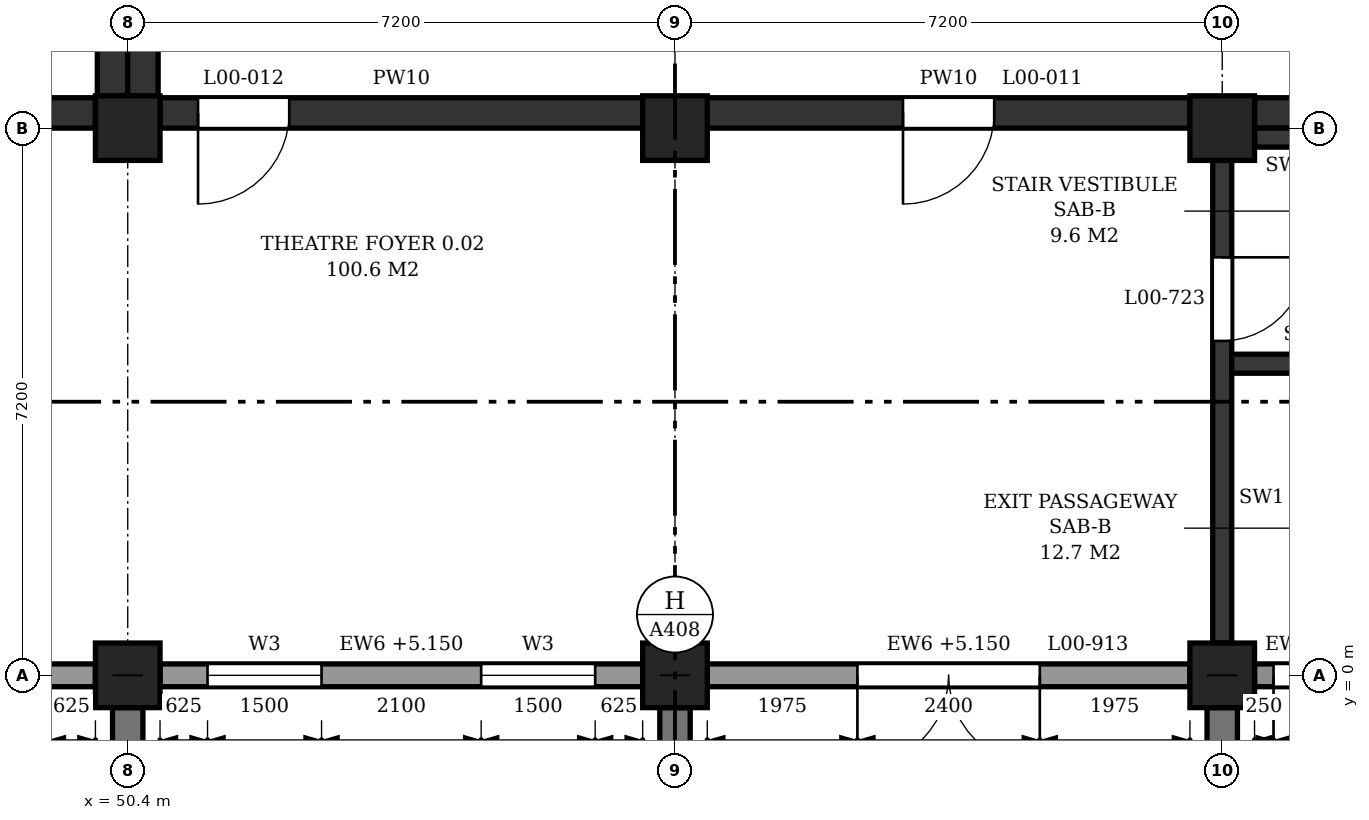
"""IFC4 building model, lengths in metres.
Left out: names, types, materials, properties, quantities, classifications, styles, units other than length and angle.
Written with IfcOpenShell. Run it as: python <this file> out.ifc"""

import sys

from ifc_helpers import new_model, si_unit, direction, frame, frame_2d, origin, origin_2d, place, context, subcontext, project, spatial, polyline, rectangle, outline, extrude, element, fill, save


model = new_model("IFC4")
c1 = context("Model", 3, precision=1e-05, world=origin(), true_north=direction((0.0, 1.0)))
c2 = subcontext(c1, "Body", "Model", "MODEL_VIEW")
j1 = project(units=[si_unit("LENGTHUNIT", "METRE"), si_unit("PLANEANGLEUNIT", "RADIAN")], contexts=[c1])
p1 = place(None, origin())
s1 = spatial("IfcSite", under=j1, at=p1, CompositionType="ELEMENT")
p2 = place(p1, origin())
s2 = spatial("IfcBuilding", under=s1, at=p2, CompositionType="ELEMENT")
p3 = place(p2, origin())
s3 = spatial("IfcBuildingStorey", under=s2, at=p3, CompositionType="ELEMENT", Elevation=0.0)
for number, where, z_axis, x_axis in (
    (1, (50.4, 0.0, 0.0), (0.0, 0.0, 1.0), (1.0, 0.0, 0.0)),
    (2, (50.4, 7.2, 0.0), (0.0, 0.0, 1.0), (1.0, 0.0, 0.0)),
    (3, (57.6, 0.0, 0.0), (0.0, 0.0, 1.0), (1.0, 0.0, 0.0)),
    (4, (57.6, 7.2, 0.0), (0.0, 0.0, 1.0), (1.0, 0.0, 0.0)),
    (5, (64.8, 0.0, 0.0), (0.0, 0.0, 1.0), (1.0, 0.0, 0.0)),
    (6, (64.8, 7.2, 0.0), (0.0, 0.0, 1.0), (1.0, 0.0, 0.0)),
):
    element("IfcColumn", number, at=place(p3, frame(where, z_axis=z_axis, x_axis=x_axis)), inside=s3, PredefinedType="COLUMN", context=c2, shape_type="SweptSolid", body=[
        extrude(rectangle(XDim=0.85, YDim=0.85, at=origin_2d()), origin(), (0.0, 0.0, 1.0), 6.0),
    ])
p4 = place(p3, frame((43.625, 0.0, 0.0), z_axis=(0.0, 0.0, 1.0), x_axis=(1.0, 0.0, 0.0)))
e7 = element("IfcWall", 7, at=p4, inside=s3, PredefinedType="STANDARD", context=c2, shape_type="SweptSolid", body=[
    extrude(rectangle(XDim=6.35, YDim=0.3, at=frame_2d((3.175, 0.0))), origin(), (0.0, 0.0, 1.0), 5.15),
])
p5 = place(p4, frame((0.625, 0.0, 0.9)))
e8 = element("IfcOpeningElement", 8, at=p5, cuts=e7, PredefinedType="OPENING", context=c2, shape_type="SweptSolid", body=[
    extrude(outline(polyline([(0.0, 0.0), (1.5, 0.0), (1.5, 3.25), (0.75, 4.0), (0.0, 3.25), (0.0, 0.0)])), frame((0.0, 0.16, 0.0), z_axis=(0.0, -1.0, 0.0), x_axis=(1.0, 0.0, 0.0)), (0.0, 0.0, 1.0), 0.32),
])
p6 = place(p4, frame((4.225, 0.0, 0.9)))
e9 = element("IfcOpeningElement", 9, at=p6, cuts=e7, PredefinedType="OPENING", context=c2, shape_type="SweptSolid", body=[
    extrude(outline(polyline([(0.0, 0.0), (1.5, 0.0), (1.5, 3.25), (0.75, 4.0), (0.0, 3.25), (0.0, 0.0)])), frame((0.0, 0.16, 0.0), z_axis=(0.0, -1.0, 0.0), x_axis=(1.0, 0.0, 0.0)), (0.0, 0.0, 1.0), 0.32),
])
p7 = place(p3, frame((50.825, 0.0, 0.0), z_axis=(0.0, 0.0, 1.0), x_axis=(1.0, 0.0, 0.0)))
e10 = element("IfcWall", 10, at=p7, inside=s3, PredefinedType="STANDARD", context=c2, shape_type="SweptSolid", body=[
    extrude(rectangle(XDim=6.35, YDim=0.3, at=frame_2d((3.175, 0.0))), origin(), (0.0, 0.0, 1.0), 5.15),
])
p8 = place(p7, frame((0.625, 0.0, 0.9)))
e11 = element("IfcOpeningElement", 11, at=p8, cuts=e10, PredefinedType="OPENING", context=c2, shape_type="SweptSolid", body=[
    extrude(outline(polyline([(0.0, 0.0), (1.5, 0.0), (1.5, 3.25), (0.75, 4.0), (0.0, 3.25), (0.0, 0.0)])), frame((0.0, 0.16, 0.0), z_axis=(0.0, -1.0, 0.0), x_axis=(1.0, 0.0, 0.0)), (0.0, 0.0, 1.0), 0.32),
])
p9 = place(p7, frame((4.225, 0.0, 0.9)))
e12 = element("IfcOpeningElement", 12, at=p9, cuts=e10, PredefinedType="OPENING", context=c2, shape_type="SweptSolid", body=[
    extrude(outline(polyline([(0.0, 0.0), (1.5, 0.0), (1.5, 3.25), (0.75, 4.0), (0.0, 3.25), (0.0, 0.0)])), frame((0.0, 0.16, 0.0), z_axis=(0.0, -1.0, 0.0), x_axis=(1.0, 0.0, 0.0)), (0.0, 0.0, 1.0), 0.32),
])
p10 = place(p3, frame((58.025, 0.0, 0.0), z_axis=(0.0, 0.0, 1.0), x_axis=(1.0, 0.0, 0.0)))
e13 = element("IfcWall", 13, at=p10, inside=s3, PredefinedType="STANDARD", context=c2, shape_type="SweptSolid", body=[
    extrude(rectangle(XDim=6.35, YDim=0.3, at=frame_2d((3.175, 0.0))), origin(), (0.0, 0.0, 1.0), 5.15),
])
p11 = place(p10, frame((1.975, 0.0, 0.0)))
e14 = element("IfcOpeningElement", 14, at=p11, cuts=e13, PredefinedType="OPENING", context=c2, shape_type="SweptSolid", body=[
    extrude(outline(polyline([(0.0, 0.0), (2.4, 0.0), (2.4, 2.0), (1.2, 3.2), (0.0, 2.0), (0.0, 0.0)])), frame((0.0, 0.16, 0.0), z_axis=(0.0, -1.0, 0.0), x_axis=(1.0, 0.0, 0.0)), (0.0, 0.0, 1.0), 0.32),
])
p12 = place(p3, frame((65.225, 0.0, 0.0), z_axis=(0.0, 0.0, 1.0), x_axis=(1.0, 0.0, 0.0)))
e15 = element("IfcWall", 15, at=p12, inside=s3, PredefinedType="STANDARD", context=c2, shape_type="SweptSolid", body=[
    extrude(rectangle(XDim=6.35, YDim=0.3, at=frame_2d((3.175, 0.0))), origin(), (0.0, 0.0, 1.0), 5.15),
])
p13 = place(p12, frame((0.25, 0.0, 0.0)))
e16 = element("IfcOpeningElement", 16, at=p13, cuts=e15, PredefinedType="OPENING", context=c2, shape_type="SweptSolid", body=[
    extrude(rectangle(XDim=2.0, YDim=2.1, at=frame_2d((1.0, 1.05))), frame((0.0, 0.16, 0.0), z_axis=(0.0, -1.0, 0.0), x_axis=(1.0, 0.0, 0.0)), (0.0, 0.0, 1.0), 0.32),
])
p14 = place(p12, frame((4.525, 0.0, 0.9)))
e17 = element("IfcOpeningElement", 17, at=p14, cuts=e15, PredefinedType="OPENING", context=c2, shape_type="SweptSolid", body=[
    extrude(outline(polyline([(0.0, 0.0), (0.9, 0.0), (0.9, 3.55), (0.45, 4.0), (0.0, 3.55), (0.0, 0.0)])), frame((0.0, 0.16, 0.0), z_axis=(0.0, -1.0, 0.0), x_axis=(1.0, 0.0, 0.0)), (0.0, 0.0, 1.0), 0.32),
])
for number, where, z_axis, x_axis in (
    (18, (50.4, -0.425, 0.0), (0.0, 0.0, 1.0), (0.0, -1.0, 0.0)),
    (19, (57.6, -0.425, 0.0), (0.0, 0.0, 1.0), (0.0, -1.0, 0.0)),
    (20, (64.8, -0.425, 0.0), (0.0, 0.0, 1.0), (0.0, -1.0, 0.0)),
):
    element("IfcWall", number, at=place(p3, frame(where, z_axis=z_axis, x_axis=x_axis)), inside=s3, PredefinedType="POLYGONAL", context=c2, shape_type="SweptSolid", body=[
        extrude(outline(polyline([(1.2, 0.0), (1.2, 9.825), (0.15, 11.4), (0.0, 11.4), (0.0, 0.0), (1.2, 0.0)])), frame((0.0, 0.2, 0.0), z_axis=(0.0, -1.0, 0.0), x_axis=(1.0, 0.0, 0.0)), (0.0, 0.0, 1.0), 0.4),
    ])
p15 = place(p3, frame((65.225, 7.075, 0.0), z_axis=(0.0, 0.0, 1.0), x_axis=(1.0, 0.0, 0.0)))
e21 = element("IfcWall", 21, at=p15, inside=s3, PredefinedType="SHEAR", context=c2, shape_type="SweptSolid", body=[
    extrude(rectangle(XDim=6.35, YDim=0.25, at=frame_2d((3.175, 0.0))), origin(), (0.0, 0.0, 1.0), 5.05),
])
p16 = place(p3, frame((64.8, 0.425, 0.0), z_axis=(0.0, 0.0, 1.0), x_axis=(0.0, 1.0, 0.0)))
e22 = element("IfcWall", 22, at=p16, inside=s3, PredefinedType="SHEAR", context=c2, shape_type="SweptSolid", body=[
    extrude(rectangle(XDim=6.35, YDim=0.25, at=frame_2d((3.175, 0.0))), origin(), (0.0, 0.0, 1.0), 5.0),
])
p17 = place(p16, frame((3.975, 0.0, 0.0)))
e23 = element("IfcOpeningElement", 23, at=p17, cuts=e22, PredefinedType="OPENING", context=c2, shape_type="SweptSolid", body=[
    extrude(rectangle(XDim=1.1, YDim=2.1, at=frame_2d((0.55, 1.05))), frame((0.0, 0.135, 0.0), z_axis=(0.0, -1.0, 0.0), x_axis=(1.0, 0.0, 0.0)), (0.0, 0.0, 1.0), 0.27),
])
p18 = place(p3, frame((64.925, 4.1, 0.0), z_axis=(0.0, 0.0, 1.0), x_axis=(1.0, 0.0, 0.0)))
e24 = element("IfcWall", 24, at=p18, inside=s3, PredefinedType="SHEAR", context=c2, shape_type="SweptSolid", body=[
    extrude(rectangle(XDim=2.975, YDim=0.25, at=frame_2d((1.487, 0.0))), origin(), (0.0, 0.0, 1.0), 5.75),
])
p19 = place(p18, frame((1.425, 0.0, 0.0)))
e25 = element("IfcOpeningElement", 25, at=p19, cuts=e24, PredefinedType="OPENING", context=c2, shape_type="SweptSolid", body=[
    extrude(rectangle(XDim=1.1, YDim=2.1, at=frame_2d((0.55, 1.05))), frame((0.0, 0.135, 0.0), z_axis=(0.0, -1.0, 0.0), x_axis=(1.0, 0.0, 0.0)), (0.0, 0.0, 1.0), 0.27),
])
p20 = place(p3, frame((43.625, 7.4, 0.0), z_axis=(0.0, 0.0, 1.0), x_axis=(1.0, 0.0, 0.0)))
e26 = element("IfcWall", 26, at=p20, inside=s3, PredefinedType="SOLIDWALL", context=c2, shape_type="SweptSolid", body=[
    extrude(rectangle(XDim=6.35, YDim=0.4, at=frame_2d((3.175, 0.0))), origin(), (0.0, 0.0, 1.0), 10.7),
])
p21 = place(p20, frame((2.575, 0.0, 0.0)))
e27 = element("IfcOpeningElement", 27, at=p21, cuts=e26, PredefinedType="OPENING", context=c2, shape_type="SweptSolid", body=[
    extrude(rectangle(XDim=1.2, YDim=2.1, at=frame_2d((0.6, 1.05))), frame((0.0, 0.21, 0.0), z_axis=(0.0, -1.0, 0.0), x_axis=(1.0, 0.0, 0.0)), (0.0, 0.0, 1.0), 0.42),
])
p22 = place(p3, frame((50.825, 7.4, 0.0), z_axis=(0.0, 0.0, 1.0), x_axis=(1.0, 0.0, 0.0)))
e28 = element("IfcWall", 28, at=p22, inside=s3, PredefinedType="SOLIDWALL", context=c2, shape_type="SweptSolid", body=[
    extrude(rectangle(XDim=6.35, YDim=0.4, at=frame_2d((3.175, 0.0))), origin(), (0.0, 0.0, 1.0), 10.7),
])
p23 = place(p22, frame((0.5, 0.0, 0.0)))
e29 = element("IfcOpeningElement", 29, at=p23, cuts=e28, PredefinedType="OPENING", context=c2, shape_type="SweptSolid", body=[
    extrude(rectangle(XDim=1.2, YDim=2.1, at=frame_2d((0.6, 1.05))), frame((0.0, 0.21, 0.0), z_axis=(0.0, -1.0, 0.0), x_axis=(1.0, 0.0, 0.0)), (0.0, 0.0, 1.0), 0.42),
])
p24 = place(p3, frame((58.025, 7.4, 0.0), z_axis=(0.0, 0.0, 1.0), x_axis=(1.0, 0.0, 0.0)))
e30 = element("IfcWall", 30, at=p24, inside=s3, PredefinedType="SOLIDWALL", context=c2, shape_type="SweptSolid", body=[
    extrude(rectangle(XDim=6.35, YDim=0.4, at=frame_2d((3.175, 0.0))), origin(), (0.0, 0.0, 1.0), 10.7),
])
p25 = place(p24, frame((2.575, 0.0, 0.0)))
e31 = element("IfcOpeningElement", 31, at=p25, cuts=e30, PredefinedType="OPENING", context=c2, shape_type="SweptSolid", body=[
    extrude(rectangle(XDim=1.2, YDim=2.1, at=frame_2d((0.6, 1.05))), frame((0.0, 0.21, 0.0), z_axis=(0.0, -1.0, 0.0), x_axis=(1.0, 0.0, 0.0)), (0.0, 0.0, 1.0), 0.42),
])
p26 = place(p3, frame((65.225, 7.4, 0.0), z_axis=(0.0, 0.0, 1.0), x_axis=(1.0, 0.0, 0.0)))
e32 = element("IfcWall", 32, at=p26, inside=s3, PredefinedType="SOLIDWALL", context=c2, shape_type="SweptSolid", body=[
    extrude(rectangle(XDim=6.35, YDim=0.4, at=frame_2d((3.175, 0.0))), origin(), (0.0, 0.0, 1.0), 10.7),
])
for number, where, z_axis, x_axis in (
    (33, (50.2, 7.625, 0.0), (0.0, 0.0, 1.0), (0.0, 1.0, 0.0)),
    (34, (50.6, 7.625, 0.0), (0.0, 0.0, 1.0), (0.0, 1.0, 0.0)),
):
    element("IfcWall", number, at=place(p3, frame(where, z_axis=z_axis, x_axis=x_axis)), inside=s3, PredefinedType="SOLIDWALL", context=c2, shape_type="SweptSolid", body=[
        extrude(rectangle(XDim=6.35, YDim=0.4, at=frame_2d((3.175, 0.0))), origin(), (0.0, 0.0, 1.0), 10.7),
    ])
p27 = place(p13, frame((2.0, 0.0, 0.0), z_axis=(0.0, 0.0, 1.0), x_axis=(-1.0, 0.0, 0.0)))
e35 = element("IfcDoor", 35, at=p27, inside=s3, OperationType="DOUBLE_DOOR_SINGLE_SWING", PredefinedType="DOOR", context=c2, shape_type="SweptSolid", body=[
    extrude(rectangle(XDim=2.0, YDim=2.1, at=frame_2d((1.0, 1.05))), frame((0.0, 0.025, 0.0), z_axis=(0.0, -1.0, 0.0), x_axis=(1.0, 0.0, 0.0)), (0.0, 0.0, 1.0), 0.05),
])
fill(e16, e35)
p28 = place(p11, frame((2.4, 0.0, 0.0), z_axis=(0.0, 0.0, 1.0), x_axis=(-1.0, 0.0, 0.0)))
e36 = element("IfcDoor", 36, at=p28, inside=s3, OperationType="DOUBLE_DOOR_SINGLE_SWING", PredefinedType="DOOR", context=c2, shape_type="SweptSolid", body=[
    extrude(outline(polyline([(2.4, 2.0), (1.2, 3.2), (0.0, 2.0), (0.0, 0.0), (2.4, 0.0), (2.4, 2.0)])), frame((0.0, 0.025, 0.0), z_axis=(0.0, -1.0, 0.0), x_axis=(1.0, 0.0, 0.0)), (0.0, 0.0, 1.0), 0.05),
])
fill(e14, e36)
p29 = place(p8, origin())
e37 = element("IfcWindow", 37, at=p29, inside=s3, PartitioningType="SINGLE_PANEL", PredefinedType="WINDOW", context=c2, shape_type="SweptSolid", body=[
    extrude(outline(polyline([(0.0, 0.0), (1.5, 0.0), (1.5, 3.25), (0.75, 4.0), (0.0, 3.25), (0.0, 0.0)])), frame((0.0, 0.03, 0.0), z_axis=(0.0, -1.0, 0.0), x_axis=(1.0, 0.0, 0.0)), (0.0, 0.0, 1.0), 0.06),
])
fill(e11, e37)
p30 = place(p9, origin())
e38 = element("IfcWindow", 38, at=p30, inside=s3, PartitioningType="SINGLE_PANEL", PredefinedType="WINDOW", context=c2, shape_type="SweptSolid", body=[
    extrude(outline(polyline([(0.0, 0.0), (1.5, 0.0), (1.5, 3.25), (0.75, 4.0), (0.0, 3.25), (0.0, 0.0)])), frame((0.0, 0.03, 0.0), z_axis=(0.0, -1.0, 0.0), x_axis=(1.0, 0.0, 0.0)), (0.0, 0.0, 1.0), 0.06),
])
fill(e12, e38)
p31 = place(p17, frame((1.1, 0.0, 0.0), z_axis=(0.0, 0.0, 1.0), x_axis=(-1.0, 0.0, 0.0)))
e39 = element("IfcDoor", 39, at=p31, inside=s3, OperationType="SINGLE_SWING_LEFT", PredefinedType="DOOR", context=c2, shape_type="SweptSolid", body=[
    extrude(rectangle(XDim=1.1, YDim=2.1, at=frame_2d((0.55, 1.05))), frame((0.0, 0.025, 0.0), z_axis=(0.0, -1.0, 0.0), x_axis=(1.0, 0.0, 0.0)), (0.0, 0.0, 1.0), 0.05),
])
fill(e23, e39)
p32 = place(p25, frame((1.2, 0.0, 0.0), z_axis=(0.0, 0.0, 1.0), x_axis=(-1.0, 0.0, 0.0)))
e40 = element("IfcDoor", 40, at=p32, inside=s3, OperationType="SINGLE_SWING_RIGHT", PredefinedType="DOOR", context=c2, shape_type="SweptSolid", body=[
    extrude(rectangle(XDim=1.2, YDim=2.1, at=frame_2d((0.6, 1.05))), frame((0.0, 0.025, 0.0), z_axis=(0.0, -1.0, 0.0), x_axis=(1.0, 0.0, 0.0)), (0.0, 0.0, 1.0), 0.05),
])
fill(e31, e40)
p33 = place(p23, frame((1.2, 0.0, 0.0), z_axis=(0.0, 0.0, 1.0), x_axis=(-1.0, 0.0, 0.0)))
e41 = element("IfcDoor", 41, at=p33, inside=s3, OperationType="SINGLE_SWING_RIGHT", PredefinedType="DOOR", context=c2, shape_type="SweptSolid", body=[
    extrude(rectangle(XDim=1.2, YDim=2.1, at=frame_2d((0.6, 1.05))), frame((0.0, 0.025, 0.0), z_axis=(0.0, -1.0, 0.0), x_axis=(1.0, 0.0, 0.0)), (0.0, 0.0, 1.0), 0.05),
])
fill(e29, e41)
save(model, sys.argv[1])
